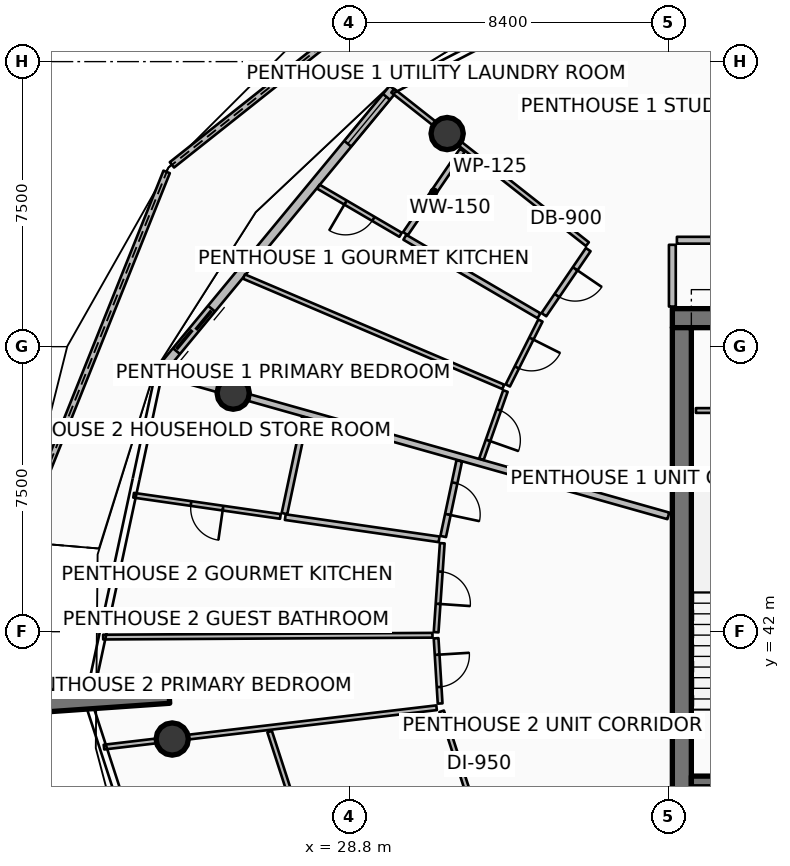
"""IFC4 building model, lengths in metres.
Left out: names, types, materials, properties, quantities, classifications, styles, units other than length and angle.
Written with IfcOpenShell. Run it as: python <this file> out.ifc"""

import sys

from ifc_helpers import new_model, si_unit, direction, frame, frame_2d, origin, origin_2d, place, context, subcontext, project, spatial, polyline, rectangle, circle, outline, extrude, element, fill, save


model = new_model("IFC4")
c1 = context("Model", 3, precision=1e-05, world=origin(), true_north=direction((0.0, 1.0)))
c2 = subcontext(c1, "Body", "Model", "MODEL_VIEW")
j1 = project(units=[si_unit("LENGTHUNIT", "METRE"), si_unit("PLANEANGLEUNIT", "RADIAN")], contexts=[c1])
p1 = place(None, origin())
s1 = spatial("IfcSite", under=j1, at=p1, CompositionType="ELEMENT")
p2 = place(p1, origin())
s2 = spatial("IfcBuilding", under=s1, at=p2, CompositionType="ELEMENT")
p3 = place(p2, frame((0.0, 0.0, 330.5)))
s3 = spatial("IfcBuildingStorey", under=s2, at=p3, CompositionType="ELEMENT", Elevation=330.5)
p4 = place(p3, frame((37.3, 50.25, 0.0), z_axis=(0.0, 0.0, 1.0), x_axis=(1.0, 0.0, 0.0)))
e1 = element("IfcWall", 1, at=p4, inside=s3, PredefinedType="SHEAR", context=c2, shape_type="SweptSolid", body=[
    extrude(rectangle(XDim=9.6, YDim=0.5, at=frame_2d((4.8, 0.0))), origin(), (0.0, 0.0, 1.0), 4.2),
])
p5 = place(p3, frame((37.55, 34.0, 0.0), z_axis=(0.0, 0.0, 1.0), x_axis=(0.0, 1.0, 0.0)))
e2 = element("IfcWall", 2, at=p5, inside=s3, PredefinedType="SHEAR", context=c2, shape_type="SweptSolid", body=[
    extrude(rectangle(XDim=16.0, YDim=0.5, at=frame_2d((8.0, 0.0))), origin(), (0.0, 0.0, 1.0), 4.2),
])
for number, where, z_axis, x_axis in (
    (3, (37.8, 38.06, 0.0), (0.0, 0.0, 1.0), (1.0, 0.0, 0.0)),
    (4, (37.8, 45.94, 0.0), (0.0, 0.0, 1.0), (1.0, 0.0, 0.0)),
):
    element("IfcWall", number, at=place(p3, frame(where, z_axis=z_axis, x_axis=x_axis)), inside=s3, PredefinedType="SHEAR", context=c2, shape_type="SweptSolid", body=[
        extrude(rectangle(XDim=3.5, YDim=0.28, at=frame_2d((1.75, 0.0))), origin(), (0.0, 0.0, 1.0), 4.2),
    ])
p6 = place(p3, frame((24.059, 40.326, 0.0), z_axis=(0.0, 0.0, 1.0), x_axis=(-0.997564163539, -0.069754853754, 0.0)))
e5 = element("IfcWall", 5, at=p6, inside=s3, PredefinedType="SOLIDWALL", context=c2, shape_type="SweptSolid", body=[
    extrude(rectangle(XDim=3.5, YDim=0.42, at=frame_2d((1.75, 0.0))), origin(), (0.0, 0.0, 1.0), 4.2),
])
for number, where, z_axis, x_axis in (
    (6, (31.374, 55.107, 0.0), (0.0, 0.0, 1.0), (1.0, 0.0, 0.0)),
    (7, (25.744, 48.277, 0.0), (0.0, 0.0, 1.0), (1.0, 0.0, 0.0)),
    (8, (24.14, 39.176, 0.0), (0.0, 0.0, 1.0), (1.0, 0.0, 0.0)),
):
    element("IfcColumn", number, at=place(p3, frame(where, z_axis=z_axis, x_axis=x_axis)), inside=s3, PredefinedType="COLUMN", context=c2, shape_type="SweptSolid", body=[
        extrude(circle(Radius=0.425, at=origin_2d()), origin(), (0.0, 0.0, 1.0), 3.94),
    ])
p7 = place(p3, frame((31.988, 60.517, 0.0), z_axis=(0.0, 0.0, 1.0), x_axis=(-0.78337055778, -0.621554960727, 0.0)))
e9 = element("IfcWall", 9, at=p7, inside=s3, PredefinedType="PARAPET", context=c2, shape_type="SweptSolid", body=[
    extrude(outline(polyline([(0.0, 0.0), (10.029, 0.0), (10.029, 1.832), (5.014, 1.853), (0.0, 1.756), (0.0, 0.0)])), frame((0.0, 0.09, 0.0), z_axis=(0.0, -1.0, 0.0), x_axis=(1.0, 0.0, 0.0)), (0.0, 0.0, 1.0), 0.18),
])
p8 = place(p3, frame((23.993, 54.098, 0.0), z_axis=(0.0, 0.0, 1.0), x_axis=(-0.372269858955, -0.928124534809, 0.0)))
e10 = element("IfcWall", 10, at=p8, inside=s3, PredefinedType="PARAPET", context=c2, shape_type="SweptSolid", body=[
    extrude(outline(polyline([(0.0, 0.0), (10.483, 0.0), (10.483, 1.497), (5.242, 1.696), (0.0, 1.832), (0.0, 0.0)])), frame((0.0, 0.09, 0.0), z_axis=(0.0, -1.0, 0.0), x_axis=(1.0, 0.0, 0.0)), (0.0, 0.0, 1.0), 0.18),
])
p9 = place(p3, frame((29.955, 56.289, 0.0), z_axis=(0.0, 0.0, 1.0), x_axis=(-0.636803612721, -0.771026042897, 0.0)))
e11 = element("IfcWall", 11, at=p9, inside=s3, PredefinedType="SOLIDWALL", context=c2, shape_type="SweptSolid", body=[
    extrude(rectangle(XDim=9.728, YDim=0.24, at=frame_2d((4.864, 0.0))), origin(), (0.0, 0.0, 1.0), 2.89),
])
p10 = place(p9, frame((7.508, 0.0, 0.0)))
e12 = element("IfcOpeningElement", 12, at=p10, cuts=e11, PredefinedType="OPENING", context=c2, shape_type="SweptSolid", body=[
    extrude(rectangle(XDim=1.45, YDim=2.15, at=frame_2d((0.725, 1.075))), frame((0.0, 0.13, 0.0), z_axis=(0.0, -1.0, 0.0), x_axis=(1.0, 0.0, 0.0)), (0.0, 0.0, 1.0), 0.26),
])
p11 = place(p9, frame((0.28, 0.0, 0.65)))
e13 = element("IfcOpeningElement", 13, at=p11, cuts=e11, PredefinedType="OPENING", context=c2, shape_type="SweptSolid", body=[
    extrude(rectangle(XDim=1.6, YDim=1.5, at=frame_2d((0.8, 0.75))), frame((0.0, 0.13, 0.0), z_axis=(0.0, -1.0, 0.0), x_axis=(1.0, 0.0, 0.0)), (0.0, 0.0, 1.0), 0.26),
])
p12 = place(p3, frame((37.92, 47.82, 0.0), z_axis=(0.0, 0.0, 1.0), x_axis=(1.0, 0.0, 0.0)))
e14 = element("IfcWall", 14, at=p12, inside=s3, PredefinedType="PARTITIONING", context=c2, shape_type="SweptSolid", body=[
    extrude(rectangle(XDim=8.78, YDim=0.125, at=frame_2d((4.39, 0.0))), origin(), (0.0, 0.0, 1.0), 3.38),
])
p13 = place(p12, frame((3.965, 0.0, 0.0)))
e15 = element("IfcOpeningElement", 15, at=p13, cuts=e14, PredefinedType="OPENING", context=c2, shape_type="SweptSolid", body=[
    extrude(rectangle(XDim=0.85, YDim=2.06, at=frame_2d((0.425, 1.03))), frame((0.0, 0.073, 0.0), z_axis=(0.0, -1.0, 0.0), x_axis=(1.0, 0.0, 0.0)), (0.0, 0.0, 1.0), 0.145),
])
p14 = place(p3, frame((42.232, 52.3, 0.0), z_axis=(0.0, 0.0, 1.0), x_axis=(-0.488623665245, 0.872494649704, 0.0)))
e16 = element("IfcWall", 16, at=p14, inside=s3, PredefinedType="PARTITIONING", context=c2, shape_type="SweptSolid", body=[
    extrude(rectangle(XDim=9.157, YDim=0.18, at=frame_2d((4.579, 0.0))), origin(), (0.0, 0.0, 1.0), 3.38),
])
p15 = place(p3, frame((37.194, 45.048, 0.0), z_axis=(0.0, 0.0, 1.0), x_axis=(-0.962457024049, 0.271434111451, 0.0)))
e17 = element("IfcWall", 17, at=p15, inside=s3, PredefinedType="PARTITIONING", context=c2, shape_type="SweptSolid", body=[
    extrude(rectangle(XDim=13.799, YDim=0.18, at=frame_2d((6.9, 0.0))), origin(), (0.0, 0.0, 1.0), 3.38),
])
p16 = place(p3, frame((42.112, 52.3, 0.0), z_axis=(0.0, 0.0, 1.0), x_axis=(-1.0, 0.0, 0.0)))
e18 = element("IfcWall", 18, at=p16, inside=s3, PredefinedType="PARTITIONING", context=c2, shape_type="SweptSolid", body=[
    extrude(rectangle(XDim=4.692, YDim=0.18, at=frame_2d((2.346, 0.0))), origin(), (0.0, 0.0, 1.0), 3.38),
])
p17 = place(p16, frame((1.796, 0.0, 0.0)))
e19 = element("IfcOpeningElement", 19, at=p17, cuts=e18, PredefinedType="OPENING", context=c2, shape_type="SweptSolid", body=[
    extrude(rectangle(XDim=1.1, YDim=2.1, at=frame_2d((0.55, 1.05))), frame((0.0, 0.1, 0.0), z_axis=(0.0, -1.0, 0.0), x_axis=(1.0, 0.0, 0.0)), (0.0, 0.0, 1.0), 0.2),
])
p18 = place(p3, frame((37.3, 52.18, 0.0), z_axis=(0.0, 0.0, 1.0), x_axis=(0.0, -1.0, 0.0)))
e20 = element("IfcWall", 20, at=p18, inside=s3, PredefinedType="PARTITIONING", context=c2, shape_type="SweptSolid", body=[
    extrude(rectangle(XDim=1.625, YDim=0.18, at=frame_2d((0.812, 0.0))), origin(), (0.0, 0.0, 1.0), 3.38),
])
p19 = place(p3, frame((35.064, 52.198, 0.0), z_axis=(0.0, 0.0, 1.0), x_axis=(-0.785319571145, 0.619090600136, 0.0)))
e21 = element("IfcWall", 21, at=p19, inside=s3, PredefinedType="PARTITIONING", context=c2, shape_type="SweptSolid", body=[
    extrude(rectangle(XDim=6.521, YDim=0.125, at=frame_2d((3.26, 0.0))), origin(), (0.0, 0.0, 1.0), 3.38),
])
p20 = place(p3, frame((35.086, 52.053, 0.0), z_axis=(0.0, 0.0, 1.0), x_axis=(-0.563373395767, -0.826202406763, 0.0)))
e22 = element("IfcWall", 22, at=p20, inside=s3, PredefinedType="PARTITIONING", context=c2, shape_type="SweptSolid", body=[
    extrude(rectangle(XDim=2.072, YDim=0.15, at=frame_2d((1.036, 0.0))), origin(), (0.0, 0.0, 1.0), 3.38),
])
p21 = place(p20, frame((0.611, 0.0, 0.0)))
e23 = element("IfcOpeningElement", 23, at=p21, cuts=e22, PredefinedType="OPENING", context=c2, shape_type="SweptSolid", body=[
    extrude(rectangle(XDim=0.85, YDim=2.06, at=frame_2d((0.425, 1.03))), frame((0.0, 0.085, 0.0), z_axis=(0.0, -1.0, 0.0), x_axis=(1.0, 0.0, 0.0)), (0.0, 0.0, 1.0), 0.17),
])
p22 = place(p3, frame((31.772, 54.666, 0.0), z_axis=(0.0, 0.0, 1.0), x_axis=(-0.563393907047, -0.826188420097, 0.0)))
e24 = element("IfcWall", 24, at=p22, inside=s3, PredefinedType="PARTITIONING", context=c2, shape_type="SweptSolid", body=[
    extrude(rectangle(XDim=2.654, YDim=0.15, at=frame_2d((1.327, 0.0))), origin(), (0.0, 0.0, 1.0), 3.38),
])
p23 = place(p3, frame((33.791, 50.313, 0.0), z_axis=(0.0, 0.0, 1.0), x_axis=(-0.863113475275, 0.505010028413, 0.0)))
e25 = element("IfcWall", 25, at=p23, inside=s3, PredefinedType="PARTITIONING", context=c2, shape_type="SweptSolid", body=[
    extrude(rectangle(XDim=4.09, YDim=0.15, at=frame_2d((2.045, 0.0))), origin(), (0.0, 0.0, 1.0), 3.38),
])
p24 = place(p3, frame((30.149, 52.444, 0.0), z_axis=(0.0, 0.0, 1.0), x_axis=(-0.863096282512, 0.505039411446, 0.0)))
e26 = element("IfcWall", 26, at=p24, inside=s3, PredefinedType="PARTITIONING", context=c2, shape_type="SweptSolid", body=[
    extrude(rectangle(XDim=2.507, YDim=0.125, at=frame_2d((1.253, 0.0))), origin(), (0.0, 0.0, 1.0), 3.38),
])
p25 = place(p24, frame((0.828, 0.0, 0.0)))
e27 = element("IfcOpeningElement", 27, at=p25, cuts=e26, PredefinedType="OPENING", context=c2, shape_type="SweptSolid", body=[
    extrude(rectangle(XDim=0.85, YDim=2.06, at=frame_2d((0.425, 1.03))), frame((0.0, 0.073, 0.0), z_axis=(0.0, -1.0, 0.0), x_axis=(1.0, 0.0, 0.0)), (0.0, 0.0, 1.0), 0.145),
])
p26 = place(p3, frame((32.851, 48.443, 0.0), z_axis=(0.0, 0.0, 1.0), x_axis=(-0.92023815321, 0.391358839655, 0.0)))
e28 = element("IfcWall", 28, at=p26, inside=s3, PredefinedType="PARTITIONING", context=c2, shape_type="SweptSolid", body=[
    extrude(rectangle(XDim=7.416, YDim=0.125, at=frame_2d((3.708, 0.0))), origin(), (0.0, 0.0, 1.0), 3.38),
])
p27 = place(p3, frame((33.828, 50.187, 0.0), z_axis=(0.0, 0.0, 1.0), x_axis=(-0.449051769977, -0.893505740262, 0.0)))
e29 = element("IfcWall", 29, at=p27, inside=s3, PredefinedType="PARTITIONING", context=c2, shape_type="SweptSolid", body=[
    extrude(rectangle(XDim=1.912, YDim=0.125, at=frame_2d((0.956, 0.0))), origin(), (0.0, 0.0, 1.0), 3.38),
])
p28 = place(p27, frame((0.531, 0.0, 0.0)))
e30 = element("IfcOpeningElement", 30, at=p28, cuts=e29, PredefinedType="OPENING", context=c2, shape_type="SweptSolid", body=[
    extrude(rectangle(XDim=0.85, YDim=2.06, at=frame_2d((0.425, 1.03))), frame((0.0, 0.073, 0.0), z_axis=(0.0, -1.0, 0.0), x_axis=(1.0, 0.0, 0.0)), (0.0, 0.0, 1.0), 0.145),
])
p29 = place(p3, frame((32.907, 48.332, 0.0), z_axis=(0.0, 0.0, 1.0), x_axis=(-0.332128336942, -0.943234206229, 0.0)))
e31 = element("IfcWall", 31, at=p29, inside=s3, PredefinedType="PARTITIONING", context=c2, shape_type="SweptSolid", body=[
    extrude(rectangle(XDim=1.902, YDim=0.125, at=frame_2d((0.951, 0.0))), origin(), (0.0, 0.0, 1.0), 3.38),
])
p30 = place(p29, frame((0.526, 0.0, 0.0)))
e32 = element("IfcOpeningElement", 32, at=p30, cuts=e31, PredefinedType="OPENING", context=c2, shape_type="SweptSolid", body=[
    extrude(rectangle(XDim=0.85, YDim=2.06, at=frame_2d((0.425, 1.03))), frame((0.0, 0.073, 0.0), z_axis=(0.0, -1.0, 0.0), x_axis=(1.0, 0.0, 0.0)), (0.0, 0.0, 1.0), 0.145),
])
p31 = place(p3, frame((31.692, 46.496, 0.0), z_axis=(0.0, 0.0, 1.0), x_axis=(-0.207455496804, -0.978244456588, 0.0)))
e33 = element("IfcWall", 33, at=p31, inside=s3, PredefinedType="PARTITIONING", context=c2, shape_type="SweptSolid", body=[
    extrude(rectangle(XDim=2.035, YDim=0.15, at=frame_2d((1.017, 0.0))), origin(), (0.0, 0.0, 1.0), 3.38),
])
p32 = place(p31, frame((0.592, 0.0, 0.0)))
e34 = element("IfcOpeningElement", 34, at=p32, cuts=e33, PredefinedType="OPENING", context=c2, shape_type="SweptSolid", body=[
    extrude(rectangle(XDim=0.85, YDim=2.06, at=frame_2d((0.425, 1.03))), frame((0.0, 0.085, 0.0), z_axis=(0.0, -1.0, 0.0), x_axis=(1.0, 0.0, 0.0)), (0.0, 0.0, 1.0), 0.17),
])
p33 = place(p3, frame((27.631, 47.641, 0.0), z_axis=(0.0, 0.0, 1.0), x_axis=(-0.207597158551, -0.978214403779, 0.0)))
e35 = element("IfcWall", 35, at=p33, inside=s3, PredefinedType="PARTITIONING", context=c2, shape_type="SweptSolid", body=[
    extrude(rectangle(XDim=2.59, YDim=0.15, at=frame_2d((1.295, 0.0))), origin(), (0.0, 0.0, 1.0), 3.38),
])
p34 = place(p3, frame((31.162, 44.43, 0.0), z_axis=(0.0, 0.0, 1.0), x_axis=(-0.989744304981, 0.142850308916, 0.0)))
e36 = element("IfcWall", 36, at=p34, inside=s3, PredefinedType="PARTITIONING", context=c2, shape_type="SweptSolid", body=[
    extrude(rectangle(XDim=4.09, YDim=0.15, at=frame_2d((2.045, 0.0))), origin(), (0.0, 0.0, 1.0), 3.38),
])
p35 = place(p3, frame((26.986, 45.033, 0.0), z_axis=(0.0, 0.0, 1.0), x_axis=(-0.989744483193, 0.142849074164, 0.0)))
e37 = element("IfcWall", 37, at=p35, inside=s3, PredefinedType="PARTITIONING", context=c2, shape_type="SweptSolid", body=[
    extrude(rectangle(XDim=3.902, YDim=0.125, at=frame_2d((1.951, 0.0))), origin(), (0.0, 0.0, 1.0), 3.38),
])
p36 = place(p35, frame((1.526, 0.0, 0.0)))
e38 = element("IfcOpeningElement", 38, at=p36, cuts=e37, PredefinedType="OPENING", context=c2, shape_type="SweptSolid", body=[
    extrude(rectangle(XDim=0.85, YDim=2.06, at=frame_2d((0.425, 1.03))), frame((0.0, 0.073, 0.0), z_axis=(0.0, -1.0, 0.0), x_axis=(1.0, 0.0, 0.0)), (0.0, 0.0, 1.0), 0.145),
])
p37 = place(p3, frame((30.988, 41.906, 0.0), z_axis=(0.0, 0.0, 1.0), x_axis=(-0.999984908948, -0.005493803382, 0.0)))
e39 = element("IfcWall", 39, at=p37, inside=s3, PredefinedType="PARTITIONING", context=c2, shape_type="SweptSolid", body=[
    extrude(rectangle(XDim=8.666, YDim=0.125, at=frame_2d((4.333, 0.0))), origin(), (0.0, 0.0, 1.0), 3.38),
])
p38 = place(p3, frame((31.245, 44.327, 0.0), z_axis=(0.0, 0.0, 1.0), x_axis=(-0.068873502497, -0.997625400967, 0.0)))
e40 = element("IfcWall", 40, at=p38, inside=s3, PredefinedType="PARTITIONING", context=c2, shape_type="SweptSolid", body=[
    extrude(rectangle(XDim=2.347, YDim=0.125, at=frame_2d((1.173, 0.0))), origin(), (0.0, 0.0, 1.0), 3.38),
])
p39 = place(p38, frame((0.748, 0.0, 0.0)))
e41 = element("IfcOpeningElement", 41, at=p39, cuts=e40, PredefinedType="OPENING", context=c2, shape_type="SweptSolid", body=[
    extrude(rectangle(XDim=0.85, YDim=2.06, at=frame_2d((0.425, 1.03))), frame((0.0, 0.073, 0.0), z_axis=(0.0, -1.0, 0.0), x_axis=(1.0, 0.0, 0.0)), (0.0, 0.0, 1.0), 0.145),
])
p40 = place(p3, frame((31.083, 41.827, 0.0), z_axis=(0.0, 0.0, 1.0), x_axis=(0.061626842896, -0.998099259711, 0.0)))
e42 = element("IfcWall", 42, at=p40, inside=s3, PredefinedType="PARTITIONING", context=c2, shape_type="SweptSolid", body=[
    extrude(rectangle(XDim=1.719, YDim=0.125, at=frame_2d((0.86, 0.0))), origin(), (0.0, 0.0, 1.0), 3.38),
])
p41 = place(p40, frame((0.435, 0.0, 0.0)))
e43 = element("IfcOpeningElement", 43, at=p41, cuts=e42, PredefinedType="OPENING", context=c2, shape_type="SweptSolid", body=[
    extrude(rectangle(XDim=0.85, YDim=2.06, at=frame_2d((0.425, 1.03))), frame((0.0, 0.073, 0.0), z_axis=(0.0, -1.0, 0.0), x_axis=(1.0, 0.0, 0.0)), (0.0, 0.0, 1.0), 0.145),
])
p42 = place(p3, frame((31.096, 39.999, 0.0), z_axis=(0.0, 0.0, 1.0), x_axis=(-0.993069250604, -0.117530691761, 0.0)))
e44 = element("IfcWall", 44, at=p42, inside=s3, PredefinedType="PARTITIONING", context=c2, shape_type="SweptSolid", body=[
    extrude(rectangle(XDim=8.814, YDim=0.125, at=frame_2d((4.407, 0.0))), origin(), (0.0, 0.0, 1.0), 3.38),
])
p43 = place(p3, frame((31.229, 39.906, 0.0), z_axis=(0.0, 0.0, 1.0), x_axis=(0.309023798792, -0.951054305379, 0.0)))
e45 = element("IfcWall", 45, at=p43, inside=s3, PredefinedType="PARTITIONING", context=c2, shape_type="SweptSolid", body=[
    extrude(rectangle(XDim=6.383, YDim=0.125, at=frame_2d((3.191, 0.0))), origin(), (0.0, 0.0, 1.0), 3.38),
])
p44 = place(p43, frame((2.741, 0.0, 0.0)))
e46 = element("IfcOpeningElement", 46, at=p44, cuts=e45, PredefinedType="OPENING", context=c2, shape_type="SweptSolid", body=[
    extrude(rectangle(XDim=0.9, YDim=2.08, at=frame_2d((0.45, 1.04))), frame((0.0, 0.073, 0.0), z_axis=(0.0, -1.0, 0.0), x_axis=(1.0, 0.0, 0.0)), (0.0, 0.0, 1.0), 0.145),
])
p45 = place(p3, frame((26.703, 39.371, 0.0), z_axis=(0.0, 0.0, 1.0), x_axis=(0.309021134762, -0.951055170992, 0.0)))
e47 = element("IfcWall", 47, at=p45, inside=s3, PredefinedType="PARTITIONING", context=c2, shape_type="SweptSolid", body=[
    extrude(rectangle(XDim=8.161, YDim=0.125, at=frame_2d((4.081, 0.0))), origin(), (0.0, 0.0, 1.0), 3.38),
])
p46 = place(p45, frame((3.631, 0.0, 0.0)))
e48 = element("IfcOpeningElement", 48, at=p46, cuts=e47, PredefinedType="OPENING", context=c2, shape_type="SweptSolid", body=[
    extrude(rectangle(XDim=0.9, YDim=2.08, at=frame_2d((0.45, 1.04))), frame((0.0, 0.073, 0.0), z_axis=(0.0, -1.0, 0.0), x_axis=(1.0, 0.0, 0.0)), (0.0, 0.0, 1.0), 0.145),
])
p47 = place(p10, origin())
e49 = element("IfcDoor", 49, at=p47, inside=s3, OperationType="DOUBLE_DOOR_SLIDING", PredefinedType="DOOR", context=c2, shape_type="SweptSolid", body=[
    extrude(rectangle(XDim=1.45, YDim=2.15, at=frame_2d((0.725, 1.075))), frame((0.0, 0.025, 0.0), z_axis=(0.0, -1.0, 0.0), x_axis=(1.0, 0.0, 0.0)), (0.0, 0.0, 1.0), 0.05),
])
fill(e12, e49)
p48 = place(p11, origin())
e50 = element("IfcWindow", 50, at=p48, inside=s3, PartitioningType="SINGLE_PANEL", PredefinedType="WINDOW", context=c2, shape_type="SweptSolid", body=[
    extrude(rectangle(XDim=1.6, YDim=1.5, at=frame_2d((0.8, 0.75))), frame((0.0, 0.03, 0.0), z_axis=(0.0, -1.0, 0.0), x_axis=(1.0, 0.0, 0.0)), (0.0, 0.0, 1.0), 0.06),
])
fill(e13, e50)
p49 = place(p21, origin())
e51 = element("IfcDoor", 51, at=p49, inside=s3, OperationType="SINGLE_SWING_LEFT", PredefinedType="DOOR", context=c2, shape_type="SweptSolid", body=[
    extrude(rectangle(XDim=0.85, YDim=2.06, at=frame_2d((0.425, 1.03))), frame((0.0, 0.025, 0.0), z_axis=(0.0, -1.0, 0.0), x_axis=(1.0, 0.0, 0.0)), (0.0, 0.0, 1.0), 0.05),
])
fill(e23, e51)
p50 = place(p25, origin())
e52 = element("IfcDoor", 52, at=p50, inside=s3, OperationType="SINGLE_SWING_RIGHT", PredefinedType="DOOR", context=c2, shape_type="SweptSolid", body=[
    extrude(rectangle(XDim=0.85, YDim=2.06, at=frame_2d((0.425, 1.03))), frame((0.0, 0.025, 0.0), z_axis=(0.0, -1.0, 0.0), x_axis=(1.0, 0.0, 0.0)), (0.0, 0.0, 1.0), 0.05),
])
fill(e27, e52)
p51 = place(p28, origin())
e53 = element("IfcDoor", 53, at=p51, inside=s3, OperationType="SINGLE_SWING_LEFT", PredefinedType="DOOR", context=c2, shape_type="SweptSolid", body=[
    extrude(rectangle(XDim=0.85, YDim=2.06, at=frame_2d((0.425, 1.03))), frame((0.0, 0.025, 0.0), z_axis=(0.0, -1.0, 0.0), x_axis=(1.0, 0.0, 0.0)), (0.0, 0.0, 1.0), 0.05),
])
fill(e30, e53)
p52 = place(p30, origin())
e54 = element("IfcDoor", 54, at=p52, inside=s3, OperationType="SINGLE_SWING_RIGHT", PredefinedType="DOOR", context=c2, shape_type="SweptSolid", body=[
    extrude(rectangle(XDim=0.85, YDim=2.06, at=frame_2d((0.425, 1.03))), frame((0.0, 0.025, 0.0), z_axis=(0.0, -1.0, 0.0), x_axis=(1.0, 0.0, 0.0)), (0.0, 0.0, 1.0), 0.05),
])
fill(e32, e54)
p53 = place(p32, origin())
e55 = element("IfcDoor", 55, at=p53, inside=s3, OperationType="SINGLE_SWING_RIGHT", PredefinedType="DOOR", context=c2, shape_type="SweptSolid", body=[
    extrude(rectangle(XDim=0.85, YDim=2.06, at=frame_2d((0.425, 1.03))), frame((0.0, 0.025, 0.0), z_axis=(0.0, -1.0, 0.0), x_axis=(1.0, 0.0, 0.0)), (0.0, 0.0, 1.0), 0.05),
])
fill(e34, e55)
p54 = place(p36, origin())
e56 = element("IfcDoor", 56, at=p54, inside=s3, OperationType="SINGLE_SWING_LEFT", PredefinedType="DOOR", context=c2, shape_type="SweptSolid", body=[
    extrude(rectangle(XDim=0.85, YDim=2.06, at=frame_2d((0.425, 1.03))), frame((0.0, 0.025, 0.0), z_axis=(0.0, -1.0, 0.0), x_axis=(1.0, 0.0, 0.0)), (0.0, 0.0, 1.0), 0.05),
])
fill(e38, e56)
p55 = place(p39, origin())
e57 = element("IfcDoor", 57, at=p55, inside=s3, OperationType="SINGLE_SWING_RIGHT", PredefinedType="DOOR", context=c2, shape_type="SweptSolid", body=[
    extrude(rectangle(XDim=0.85, YDim=2.06, at=frame_2d((0.425, 1.03))), frame((0.0, 0.025, 0.0), z_axis=(0.0, -1.0, 0.0), x_axis=(1.0, 0.0, 0.0)), (0.0, 0.0, 1.0), 0.05),
])
fill(e41, e57)
p56 = place(p41, origin())
e58 = element("IfcDoor", 58, at=p56, inside=s3, OperationType="SINGLE_SWING_LEFT", PredefinedType="DOOR", context=c2, shape_type="SweptSolid", body=[
    extrude(rectangle(XDim=0.85, YDim=2.06, at=frame_2d((0.425, 1.03))), frame((0.0, 0.025, 0.0), z_axis=(0.0, -1.0, 0.0), x_axis=(1.0, 0.0, 0.0)), (0.0, 0.0, 1.0), 0.05),
])
fill(e43, e58)
save(model, sys.argv[1])
